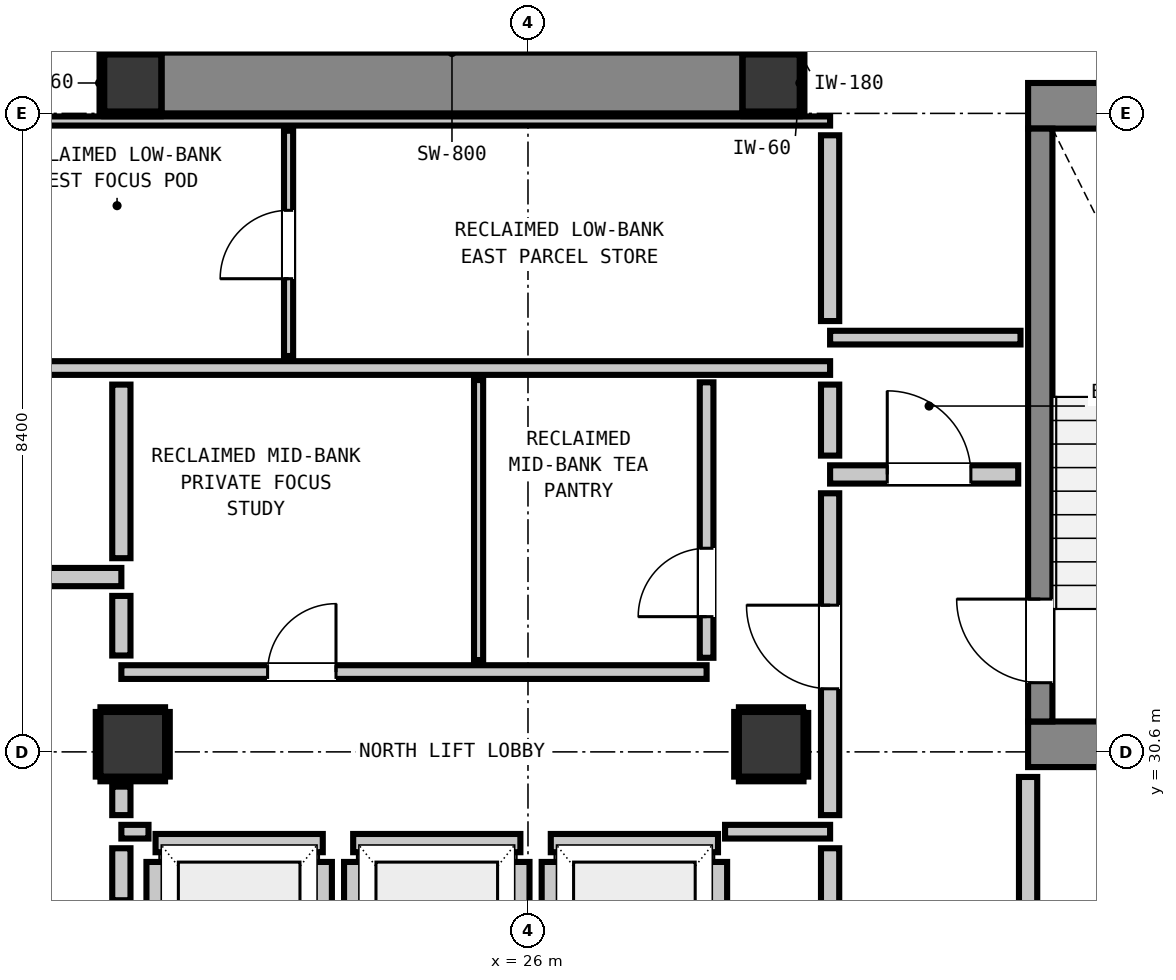
"""IFC4 building model, lengths in metres.
Left out: names, types, materials, properties, quantities, classifications, styles, units other than length and angle.
Written with IfcOpenShell. Run it as: python <this file> out.ifc"""

import sys

from ifc_helpers import new_model, si_unit, direction, frame, frame_2d, origin, origin_2d, place, context, subcontext, project, spatial, rectangle, extrude, element, fill, save


model = new_model("IFC4")
c1 = context("Model", 3, precision=1e-05, world=origin(), true_north=direction((0.0, 1.0)))
c2 = subcontext(c1, "Body", "Model", "MODEL_VIEW")
j1 = project(units=[si_unit("LENGTHUNIT", "METRE"), si_unit("PLANEANGLEUNIT", "RADIAN")], contexts=[c1])
p1 = place(None, origin())
s1 = spatial("IfcSite", under=j1, at=p1, CompositionType="ELEMENT")
p2 = place(p1, origin())
s2 = spatial("IfcBuilding", under=s1, at=p2, CompositionType="ELEMENT")
p3 = place(p2, frame((0.0, 0.0, 186.84)))
s3 = spatial("IfcBuildingStorey", under=s2, at=p3, CompositionType="ELEMENT", Elevation=186.84)
for number, where, z_axis, x_axis in (
    (1, (20.8, 39.4, 0.0), (0.0, 0.0, 1.0), (1.0, 0.0, 0.0)),
    (2, (29.2, 39.4, 0.0), (0.0, 0.0, 1.0), (1.0, 0.0, 0.0)),
):
    element("IfcColumn", number, at=place(p3, frame(where, z_axis=z_axis, x_axis=x_axis)), inside=s3, PredefinedType="COLUMN", context=c2, shape_type="SweptSolid", body=[
        extrude(rectangle(XDim=0.75, YDim=0.75, at=origin_2d()), origin(), (0.0, 0.0, 1.0), 3.32),
    ])
p4 = place(p3, frame((32.58, 39.1, 0.0), z_axis=(0.0, 0.0, 1.0), x_axis=(1.0, 0.0, 0.0)))
e3 = element("IfcWall", 3, at=p4, inside=s3, PredefinedType="SHEAR", context=c2, shape_type="SweptSolid", body=[
    extrude(rectangle(XDim=4.08, YDim=0.6, at=frame_2d((2.04, 0.0))), origin(), (0.0, 0.0, 1.0), 3.32),
])
p5 = place(p3, frame((32.58, 30.7, 0.0), z_axis=(0.0, 0.0, 1.0), x_axis=(1.0, 0.0, 0.0)))
e4 = element("IfcWall", 4, at=p5, inside=s3, PredefinedType="SHEAR", context=c2, shape_type="SweptSolid", body=[
    extrude(rectangle(XDim=3.54, YDim=0.6, at=frame_2d((1.77, 0.0))), origin(), (0.0, 0.0, 1.0), 3.32),
])
p6 = place(p3, frame((21.18, 39.4, 0.0), z_axis=(0.0, 0.0, 1.0), x_axis=(1.0, 0.0, 0.0)))
e5 = element("IfcWall", 5, at=p6, inside=s3, PredefinedType="SHEAR", context=c2, shape_type="SweptSolid", body=[
    extrude(rectangle(XDim=7.64, YDim=0.8, at=frame_2d((3.82, 0.0))), origin(), (0.0, 0.0, 1.0), 3.32),
])
p7 = place(p3, frame((32.74, 31.0, 0.0), z_axis=(0.0, 0.0, 1.0), x_axis=(0.0, 1.0, 0.0)))
e6 = element("IfcWall", 6, at=p7, inside=s3, PredefinedType="SHEAR", context=c2, shape_type="SweptSolid", body=[
    extrude(rectangle(XDim=7.8, YDim=0.32, at=frame_2d((3.9, 0.0))), origin(), (0.0, 0.0, 1.0), 3.32),
])
p8 = place(p7, frame((0.51, 0.0, 0.0)))
e7 = element("IfcOpeningElement", 7, at=p8, cuts=e6, PredefinedType="OPENING", context=c2, shape_type="SweptSolid", body=[
    extrude(rectangle(XDim=1.1, YDim=2.15, at=frame_2d((0.55, 1.075))), frame((0.0, 0.17, 0.0), z_axis=(0.0, -1.0, 0.0), x_axis=(1.0, 0.0, 0.0)), (0.0, 0.0, 1.0), 0.34),
])
for number, where, z_axis, x_axis in (
    (8, (20.8, 30.7, 0.0), (0.0, 0.0, 1.0), (1.0, 0.0, 0.0)),
    (9, (29.2, 30.7, 0.0), (0.0, 0.0, 1.0), (1.0, 0.0, 0.0)),
):
    element("IfcColumn", number, at=place(p3, frame(where, z_axis=z_axis, x_axis=x_axis)), inside=s3, PredefinedType="COLUMN", context=c2, shape_type="SweptSolid", body=[
        extrude(rectangle(XDim=0.85, YDim=0.85, at=origin_2d()), origin(), (0.0, 0.0, 1.0), 3.32),
    ])
p9 = place(p3, frame((21.1, 29.4, 0.0), z_axis=(0.0, 0.0, 1.0), x_axis=(1.0, 0.0, 0.0)))
e10 = element("IfcWall", 10, at=p9, inside=s3, PredefinedType="PARTITIONING", context=c2, shape_type="SweptSolid", body=[
    extrude(rectangle(XDim=2.2, YDim=0.24, at=frame_2d((1.1, 0.0))), origin(), (0.0, 0.0, 1.0), 2.9),
])
p10 = place(p3, frame((21.1, 27.048, 0.0), z_axis=(0.0, 0.0, 1.0), x_axis=(0.0, 1.0, 0.0)))
e11 = element("IfcWall", 11, at=p10, inside=s3, PredefinedType="PARTITIONING", context=c2, shape_type="SweptSolid", body=[
    extrude(rectangle(XDim=2.104, YDim=0.24, at=frame_2d((1.052, 0.0))), origin(), (0.0, 0.0, 1.0), 0.905),
])
p11 = place(p3, frame((23.3, 27.048, 0.0), z_axis=(0.0, 0.0, 1.0), x_axis=(0.0, 1.0, 0.0)))
e12 = element("IfcWall", 12, at=p11, inside=s3, PredefinedType="PARTITIONING", context=c2, shape_type="SweptSolid", body=[
    extrude(rectangle(XDim=2.104, YDim=0.24, at=frame_2d((1.052, 0.0))), origin(), (0.0, 0.0, 1.0), 2.9),
])
p12 = place(p3, frame((23.7, 29.4, 0.0), z_axis=(0.0, 0.0, 1.0), x_axis=(1.0, 0.0, 0.0)))
e13 = element("IfcWall", 13, at=p12, inside=s3, PredefinedType="PARTITIONING", context=c2, shape_type="SweptSolid", body=[
    extrude(rectangle(XDim=2.2, YDim=0.24, at=frame_2d((1.1, 0.0))), origin(), (0.0, 0.0, 1.0), 2.9),
])
for number, where, z_axis, x_axis in (
    (14, (23.7, 27.048, 0.0), (0.0, 0.0, 1.0), (0.0, 1.0, 0.0)),
    (15, (25.9, 27.048, 0.0), (0.0, 0.0, 1.0), (0.0, 1.0, 0.0)),
):
    element("IfcWall", number, at=place(p3, frame(where, z_axis=z_axis, x_axis=x_axis)), inside=s3, PredefinedType="PARTITIONING", context=c2, shape_type="SweptSolid", body=[
        extrude(rectangle(XDim=2.104, YDim=0.24, at=frame_2d((1.052, 0.0))), origin(), (0.0, 0.0, 1.0), 2.9),
    ])
p13 = place(p3, frame((26.3, 29.4, 0.0), z_axis=(0.0, 0.0, 1.0), x_axis=(1.0, 0.0, 0.0)))
e16 = element("IfcWall", 16, at=p13, inside=s3, PredefinedType="PARTITIONING", context=c2, shape_type="SweptSolid", body=[
    extrude(rectangle(XDim=2.2, YDim=0.24, at=frame_2d((1.1, 0.0))), origin(), (0.0, 0.0, 1.0), 2.9),
])
p14 = place(p3, frame((26.3, 27.048, 0.0), z_axis=(0.0, 0.0, 1.0), x_axis=(0.0, 1.0, 0.0)))
e17 = element("IfcWall", 17, at=p14, inside=s3, PredefinedType="PARTITIONING", context=c2, shape_type="SweptSolid", body=[
    extrude(rectangle(XDim=2.104, YDim=0.24, at=frame_2d((1.052, 0.0))), origin(), (0.0, 0.0, 1.0), 2.9),
])
p15 = place(p3, frame((28.5, 27.33, 0.0), z_axis=(0.0, 0.0, 1.0), x_axis=(0.0, 1.0, 0.0)))
e18 = element("IfcWall", 18, at=p15, inside=s3, PredefinedType="PARTITIONING", context=c2, shape_type="SweptSolid", body=[
    extrude(rectangle(XDim=1.822, YDim=0.24, at=frame_2d((0.911, 0.0))), origin(), (0.0, 0.0, 1.0), 0.905),
])
p16 = place(p3, frame((17.45, 32.9, 0.0), z_axis=(0.0, 0.0, 1.0), x_axis=(1.0, 0.0, 0.0)))
e19 = element("IfcWall", 19, at=p16, inside=s3, PredefinedType="PARTITIONING", context=c2, shape_type="SweptSolid", body=[
    extrude(rectangle(XDim=3.2, YDim=0.24, at=frame_2d((1.6, 0.0))), origin(), (0.0, 0.0, 1.0), 2.9),
])
p17 = place(p16, frame((0.159, 0.0, 0.0)))
e20 = element("IfcOpeningElement", 20, at=p17, cuts=e19, PredefinedType="OPENING", context=c2, shape_type="SweptSolid", body=[
    extrude(rectangle(XDim=1.1, YDim=2.15, at=frame_2d((0.55, 1.075))), frame((0.0, 0.13, 0.0), z_axis=(0.0, -1.0, 0.0), x_axis=(1.0, 0.0, 0.0)), (0.0, 0.0, 1.0), 0.26),
])
p18 = place(p3, frame((29.975, 34.25, 0.0), z_axis=(0.0, 0.0, 1.0), x_axis=(1.0, 0.0, 0.0)))
e21 = element("IfcWall", 21, at=p18, inside=s3, PredefinedType="PARTITIONING", context=c2, shape_type="SweptSolid", body=[
    extrude(rectangle(XDim=2.475, YDim=0.24, at=frame_2d((1.237, 0.0))), origin(), (0.0, 0.0, 1.0), 2.9),
])
p19 = place(p18, frame((0.752, 0.0, 0.0)))
e22 = element("IfcOpeningElement", 22, at=p19, cuts=e21, PredefinedType="OPENING", context=c2, shape_type="SweptSolid", body=[
    extrude(rectangle(XDim=1.1, YDim=2.15, at=frame_2d((0.55, 1.075))), frame((0.0, 0.13, 0.0), z_axis=(0.0, -1.0, 0.0), x_axis=(1.0, 0.0, 0.0)), (0.0, 0.0, 1.0), 0.26),
])
p20 = place(p3, frame((20.65, 29.55, 0.0), z_axis=(0.0, 0.0, 1.0), x_axis=(1.0, 0.0, 0.0)))
e23 = element("IfcWall", 23, at=p20, inside=s3, PredefinedType="PARTITIONING", context=c2, shape_type="SweptSolid", body=[
    extrude(rectangle(XDim=0.357, YDim=0.18, at=frame_2d((0.179, 0.0))), origin(), (0.0, 0.0, 1.0), 2.9),
])
p21 = place(p3, frame((28.593, 29.55, 0.0), z_axis=(0.0, 0.0, 1.0), x_axis=(1.0, 0.0, 0.0)))
e24 = element("IfcWall", 24, at=p21, inside=s3, PredefinedType="PARTITIONING", context=c2, shape_type="SweptSolid", body=[
    extrude(rectangle(XDim=1.382, YDim=0.18, at=frame_2d((0.691, 0.0))), origin(), (0.0, 0.0, 1.0), 2.9),
])
p22 = place(p3, frame((20.65, 31.65, 0.0), z_axis=(0.0, 0.0, 1.0), x_axis=(1.0, 0.0, 0.0)))
e25 = element("IfcWall", 25, at=p22, inside=s3, PredefinedType="PARTITIONING", context=c2, shape_type="SweptSolid", body=[
    extrude(rectangle(XDim=7.7, YDim=0.18, at=frame_2d((3.85, 0.0))), origin(), (0.0, 0.0, 1.0), 2.9),
])
p23 = place(p22, frame((1.924, 0.0, 0.0)))
e26 = element("IfcOpeningElement", 26, at=p23, cuts=e25, PredefinedType="OPENING", context=c2, shape_type="SweptSolid", body=[
    extrude(rectangle(XDim=0.9, YDim=2.1, at=frame_2d((0.45, 1.05))), frame((0.0, 0.1, 0.0), z_axis=(0.0, -1.0, 0.0), x_axis=(1.0, 0.0, 0.0)), (0.0, 0.0, 1.0), 0.2),
])
p24 = place(p3, frame((18.95, 35.65, 0.0), z_axis=(0.0, 0.0, 1.0), x_axis=(1.0, 0.0, 0.0)))
e27 = element("IfcWall", 27, at=p24, inside=s3, PredefinedType="PARTITIONING", context=c2, shape_type="SweptSolid", body=[
    extrude(rectangle(XDim=11.025, YDim=0.18, at=frame_2d((5.513, 0.0))), origin(), (0.0, 0.0, 1.0), 2.9),
])
p25 = place(p3, frame((29.975, 36.05, 0.0), z_axis=(0.0, 0.0, 1.0), x_axis=(1.0, 0.0, 0.0)))
e28 = element("IfcWall", 28, at=p25, inside=s3, PredefinedType="PARTITIONING", context=c2, shape_type="SweptSolid", body=[
    extrude(rectangle(XDim=2.505, YDim=0.18, at=frame_2d((1.252, 0.0))), origin(), (0.0, 0.0, 1.0), 2.9),
])
p26 = place(p3, frame((18.95, 38.9, 0.0), z_axis=(0.0, 0.0, 1.0), x_axis=(1.0, 0.0, 0.0)))
e29 = element("IfcWall", 29, at=p26, inside=s3, PredefinedType="PARTITIONING", context=c2, shape_type="SweptSolid", body=[
    extrude(rectangle(XDim=11.025, YDim=0.12, at=frame_2d((5.513, 0.0))), origin(), (0.0, 0.0, 1.0), 0.905),
])
p27 = place(p3, frame((20.65, 28.648, 0.0), z_axis=(0.0, 0.0, 1.0), x_axis=(0.0, 1.0, 0.0)))
e30 = element("IfcWall", 30, at=p27, inside=s3, PredefinedType="PARTITIONING", context=c2, shape_type="SweptSolid", body=[
    extrude(rectangle(XDim=0.684, YDim=0.24, at=frame_2d((0.342, 0.0))), origin(), (0.0, 0.0, 1.0), 0.905),
])
p28 = place(p3, frame((20.65, 29.768, 0.0), z_axis=(0.0, 0.0, 1.0), x_axis=(0.0, 1.0, 0.0)))
e31 = element("IfcWall", 31, at=p28, inside=s3, PredefinedType="PARTITIONING", context=c2, shape_type="SweptSolid", body=[
    extrude(rectangle(XDim=0.375, YDim=0.24, at=frame_2d((0.188, 0.0))), origin(), (0.0, 0.0, 1.0), 0.905),
])
p29 = place(p3, frame((20.65, 31.868, 0.0), z_axis=(0.0, 0.0, 1.0), x_axis=(0.0, 1.0, 0.0)))
e32 = element("IfcWall", 32, at=p29, inside=s3, PredefinedType="PARTITIONING", context=c2, shape_type="SweptSolid", body=[
    extrude(rectangle(XDim=0.784, YDim=0.24, at=frame_2d((0.392, 0.0))), origin(), (0.0, 0.0, 1.0), 0.905),
])
p30 = place(p3, frame((20.65, 33.148, 0.0), z_axis=(0.0, 0.0, 1.0), x_axis=(0.0, 1.0, 0.0)))
e33 = element("IfcWall", 33, at=p30, inside=s3, PredefinedType="PARTITIONING", context=c2, shape_type="SweptSolid", body=[
    extrude(rectangle(XDim=2.284, YDim=0.24, at=frame_2d((1.142, 0.0))), origin(), (0.0, 0.0, 1.0), 0.905),
])
p31 = place(p3, frame((29.975, 25.648, 0.0), z_axis=(0.0, 0.0, 1.0), x_axis=(0.0, 1.0, 0.0)))
e34 = element("IfcWall", 34, at=p31, inside=s3, PredefinedType="PARTITIONING", context=c2, shape_type="SweptSolid", body=[
    extrude(rectangle(XDim=3.684, YDim=0.24, at=frame_2d((1.842, 0.0))), origin(), (0.0, 0.0, 1.0), 2.9),
])
p32 = place(p3, frame((29.975, 29.768, 0.0), z_axis=(0.0, 0.0, 1.0), x_axis=(0.0, 1.0, 0.0)))
e35 = element("IfcWall", 35, at=p32, inside=s3, PredefinedType="PARTITIONING", context=c2, shape_type="SweptSolid", body=[
    extrude(rectangle(XDim=4.234, YDim=0.24, at=frame_2d((2.117, 0.0))), origin(), (0.0, 0.0, 1.0), 2.9),
])
p33 = place(p32, frame((1.662, 0.0, 0.0)))
e36 = element("IfcOpeningElement", 36, at=p33, cuts=e35, PredefinedType="OPENING", context=c2, shape_type="SweptSolid", body=[
    extrude(rectangle(XDim=1.1, YDim=2.15, at=frame_2d((0.55, 1.075))), frame((0.0, 0.13, 0.0), z_axis=(0.0, -1.0, 0.0), x_axis=(1.0, 0.0, 0.0)), (0.0, 0.0, 1.0), 0.26),
])
p34 = place(p3, frame((29.975, 34.498, 0.0), z_axis=(0.0, 0.0, 1.0), x_axis=(0.0, 1.0, 0.0)))
e37 = element("IfcWall", 37, at=p34, inside=s3, PredefinedType="PARTITIONING", context=c2, shape_type="SweptSolid", body=[
    extrude(rectangle(XDim=0.934, YDim=0.24, at=frame_2d((0.467, 0.0))), origin(), (0.0, 0.0, 1.0), 2.9),
])
p35 = place(p3, frame((29.975, 36.268, 0.0), z_axis=(0.0, 0.0, 1.0), x_axis=(0.0, 1.0, 0.0)))
e38 = element("IfcWall", 38, at=p35, inside=s3, PredefinedType="PARTITIONING", context=c2, shape_type="SweptSolid", body=[
    extrude(rectangle(XDim=2.444, YDim=0.24, at=frame_2d((1.222, 0.0))), origin(), (0.0, 0.0, 1.0), 2.9),
])
p36 = place(p3, frame((32.58, 25.648, 0.0), z_axis=(0.0, 0.0, 1.0), x_axis=(0.0, 1.0, 0.0)))
e39 = element("IfcWall", 39, at=p36, inside=s3, PredefinedType="PARTITIONING", context=c2, shape_type="SweptSolid", body=[
    extrude(rectangle(XDim=4.622, YDim=0.24, at=frame_2d((2.311, 0.0))), origin(), (0.0, 0.0, 1.0), 2.9),
])
p37 = place(p3, frame((28.35, 31.838, 0.0), z_axis=(0.0, 0.0, 1.0), x_axis=(0.0, 1.0, 0.0)))
e40 = element("IfcWall", 40, at=p37, inside=s3, PredefinedType="PARTITIONING", context=c2, shape_type="SweptSolid", body=[
    extrude(rectangle(XDim=3.624, YDim=0.18, at=frame_2d((1.812, 0.0))), origin(), (0.0, 0.0, 1.0), 2.9),
])
p38 = place(p37, frame((0.541, 0.0, 0.0)))
e41 = element("IfcOpeningElement", 41, at=p38, cuts=e40, PredefinedType="OPENING", context=c2, shape_type="SweptSolid", body=[
    extrude(rectangle(XDim=0.9, YDim=2.1, at=frame_2d((0.45, 1.05))), frame((0.0, 0.1, 0.0), z_axis=(0.0, -1.0, 0.0), x_axis=(1.0, 0.0, 0.0)), (0.0, 0.0, 1.0), 0.2),
])
p39 = place(p3, frame((22.85, 35.808, 0.0), z_axis=(0.0, 0.0, 1.0), x_axis=(0.0, 1.0, 0.0)))
e42 = element("IfcWall", 42, at=p39, inside=s3, PredefinedType="PARTITIONING", context=c2, shape_type="SweptSolid", body=[
    extrude(rectangle(XDim=2.964, YDim=0.12, at=frame_2d((1.482, 0.0))), origin(), (0.0, 0.0, 1.0), 2.9),
])
p40 = place(p39, frame((1.017, 0.0, 0.0)))
e43 = element("IfcOpeningElement", 43, at=p40, cuts=e42, PredefinedType="OPENING", context=c2, shape_type="SweptSolid", body=[
    extrude(rectangle(XDim=0.9, YDim=2.1, at=frame_2d((0.45, 1.05))), frame((0.0, 0.07, 0.0), z_axis=(0.0, -1.0, 0.0), x_axis=(1.0, 0.0, 0.0)), (0.0, 0.0, 1.0), 0.14),
])
p41 = place(p3, frame((25.35, 31.808, 0.0), z_axis=(0.0, 0.0, 1.0), x_axis=(0.0, 1.0, 0.0)))
e44 = element("IfcWall", 44, at=p41, inside=s3, PredefinedType="PARTITIONING", context=c2, shape_type="SweptSolid", body=[
    extrude(rectangle(XDim=3.684, YDim=0.12, at=frame_2d((1.842, 0.0))), origin(), (0.0, 0.0, 1.0), 2.9),
])
for number, where, z_axis, x_axis in (
    (45, (20.425, 38.993, 0.0), (0.0, 0.0, 1.0), (1.0, 0.0, 0.0)),
    (46, (20.425, 39.807, 0.0), (0.0, 0.0, 1.0), (1.0, 0.0, 0.0)),
):
    element("IfcWall", number, at=place(p3, frame(where, z_axis=z_axis, x_axis=x_axis)), inside=s3, PredefinedType="PARTITIONING", context=c2, shape_type="SweptSolid", body=[
        extrude(rectangle(XDim=0.742, YDim=0.06, at=frame_2d((0.371, 0.0))), origin(), (0.0, 0.0, 1.0), 0.905),
    ])
p42 = place(p3, frame((20.393, 39.025, 0.0), z_axis=(0.0, 0.0, 1.0), x_axis=(0.0, 1.0, 0.0)))
e47 = element("IfcWall", 47, at=p42, inside=s3, PredefinedType="PARTITIONING", context=c2, shape_type="SweptSolid", body=[
    extrude(rectangle(XDim=0.75, YDim=0.06, at=frame_2d((0.375, 0.0))), origin(), (0.0, 0.0, 1.0), 0.905),
])
for number, where, z_axis, x_axis in (
    (48, (28.833, 38.993, 0.0), (0.0, 0.0, 1.0), (1.0, 0.0, 0.0)),
    (49, (28.833, 39.807, 0.0), (0.0, 0.0, 1.0), (1.0, 0.0, 0.0)),
):
    element("IfcWall", number, at=place(p3, frame(where, z_axis=z_axis, x_axis=x_axis)), inside=s3, PredefinedType="PARTITIONING", context=c2, shape_type="SweptSolid", body=[
        extrude(rectangle(XDim=0.742, YDim=0.06, at=frame_2d((0.371, 0.0))), origin(), (0.0, 0.0, 1.0), 0.905),
    ])
p43 = place(p3, frame((29.607, 39.025, 0.0), z_axis=(0.0, 0.0, 1.0), x_axis=(0.0, 1.0, 0.0)))
e50 = element("IfcWall", 50, at=p43, inside=s3, PredefinedType="PARTITIONING", context=c2, shape_type="SweptSolid", body=[
    extrude(rectangle(XDim=0.75, YDim=0.06, at=frame_2d((0.375, 0.0))), origin(), (0.0, 0.0, 1.0), 0.905),
])
for number, where, z_axis, x_axis in (
    (51, (20.375, 30.243, 0.0), (0.0, 0.0, 1.0), (1.0, 0.0, 0.0)),
    (52, (20.375, 31.157, 0.0), (0.0, 0.0, 1.0), (1.0, 0.0, 0.0)),
    (53, (20.343, 30.275, 0.0), (0.0, 0.0, 1.0), (0.0, 1.0, 0.0)),
    (54, (21.257, 30.275, 0.0), (0.0, 0.0, 1.0), (0.0, 1.0, 0.0)),
    (55, (28.775, 30.243, 0.0), (0.0, 0.0, 1.0), (1.0, 0.0, 0.0)),
):
    element("IfcWall", number, at=place(p3, frame(where, z_axis=z_axis, x_axis=x_axis)), inside=s3, PredefinedType="PARTITIONING", context=c2, shape_type="SweptSolid", body=[
        extrude(rectangle(XDim=0.85, YDim=0.06, at=frame_2d((0.425, 0.0))), origin(), (0.0, 0.0, 1.0), 0.905),
    ])
p44 = place(p3, frame((28.775, 31.157, 0.0), z_axis=(0.0, 0.0, 1.0), x_axis=(1.0, 0.0, 0.0)))
e56 = element("IfcWall", 56, at=p44, inside=s3, PredefinedType="PARTITIONING", context=c2, shape_type="SweptSolid", body=[
    extrude(rectangle(XDim=0.843, YDim=0.06, at=frame_2d((0.421, 0.0))), origin(), (0.0, 0.0, 1.0), 0.905),
])
p45 = place(p3, frame((28.743, 30.275, 0.0), z_axis=(0.0, 0.0, 1.0), x_axis=(0.0, 1.0, 0.0)))
e57 = element("IfcWall", 57, at=p45, inside=s3, PredefinedType="PARTITIONING", context=c2, shape_type="SweptSolid", body=[
    extrude(rectangle(XDim=0.85, YDim=0.06, at=frame_2d((0.425, 0.0))), origin(), (0.0, 0.0, 1.0), 0.905),
])
p46 = place(p3, frame((29.657, 30.275, 0.0), z_axis=(0.0, 0.0, 1.0), x_axis=(0.0, 1.0, 0.0)))
e58 = element("IfcWall", 58, at=p46, inside=s3, PredefinedType="PARTITIONING", context=c2, shape_type="SweptSolid", body=[
    extrude(rectangle(XDim=0.837, YDim=0.06, at=frame_2d((0.418, 0.0))), origin(), (0.0, 0.0, 1.0), 0.905),
])
p47 = place(p8, origin())
e59 = element("IfcDoor", 59, at=p47, inside=s3, OperationType="SINGLE_SWING_RIGHT", PredefinedType="DOOR", context=c2, shape_type="SweptSolid", body=[
    extrude(rectangle(XDim=1.1, YDim=2.15, at=frame_2d((0.55, 1.075))), frame((0.0, 0.025, 0.0), z_axis=(0.0, -1.0, 0.0), x_axis=(1.0, 0.0, 0.0)), (0.0, 0.0, 1.0), 0.05),
])
fill(e7, e59)
p48 = place(p33, origin())
e60 = element("IfcDoor", 60, at=p48, inside=s3, OperationType="SINGLE_SWING_RIGHT", PredefinedType="DOOR", context=c2, shape_type="SweptSolid", body=[
    extrude(rectangle(XDim=1.1, YDim=2.15, at=frame_2d((0.55, 1.075))), frame((0.0, 0.025, 0.0), z_axis=(0.0, -1.0, 0.0), x_axis=(1.0, 0.0, 0.0)), (0.0, 0.0, 1.0), 0.05),
])
fill(e36, e60)
p49 = place(p19, origin())
e61 = element("IfcDoor", 61, at=p49, inside=s3, OperationType="SINGLE_SWING_LEFT", PredefinedType="DOOR", context=c2, shape_type="SweptSolid", body=[
    extrude(rectangle(XDim=1.1, YDim=2.15, at=frame_2d((0.55, 1.075))), frame((0.0, 0.025, 0.0), z_axis=(0.0, -1.0, 0.0), x_axis=(1.0, 0.0, 0.0)), (0.0, 0.0, 1.0), 0.05),
])
fill(e22, e61)
p50 = place(p40, origin())
e62 = element("IfcDoor", 62, at=p50, inside=s3, OperationType="SINGLE_SWING_LEFT", PredefinedType="DOOR", context=c2, shape_type="SweptSolid", body=[
    extrude(rectangle(XDim=0.9, YDim=2.1, at=frame_2d((0.45, 1.05))), frame((0.0, 0.025, 0.0), z_axis=(0.0, -1.0, 0.0), x_axis=(1.0, 0.0, 0.0)), (0.0, 0.0, 1.0), 0.05),
])
fill(e43, e62)
p51 = place(p23, origin())
e63 = element("IfcDoor", 63, at=p51, inside=s3, OperationType="SINGLE_SWING_RIGHT", PredefinedType="DOOR", context=c2, shape_type="SweptSolid", body=[
    extrude(rectangle(XDim=0.9, YDim=2.1, at=frame_2d((0.45, 1.05))), frame((0.0, 0.025, 0.0), z_axis=(0.0, -1.0, 0.0), x_axis=(1.0, 0.0, 0.0)), (0.0, 0.0, 1.0), 0.05),
])
fill(e26, e63)
p52 = place(p38, origin())
e64 = element("IfcDoor", 64, at=p52, inside=s3, OperationType="SINGLE_SWING_LEFT", PredefinedType="DOOR", context=c2, shape_type="SweptSolid", body=[
    extrude(rectangle(XDim=0.9, YDim=2.1, at=frame_2d((0.45, 1.05))), frame((0.0, 0.025, 0.0), z_axis=(0.0, -1.0, 0.0), x_axis=(1.0, 0.0, 0.0)), (0.0, 0.0, 1.0), 0.05),
])
fill(e41, e64)
save(model, sys.argv[1])
